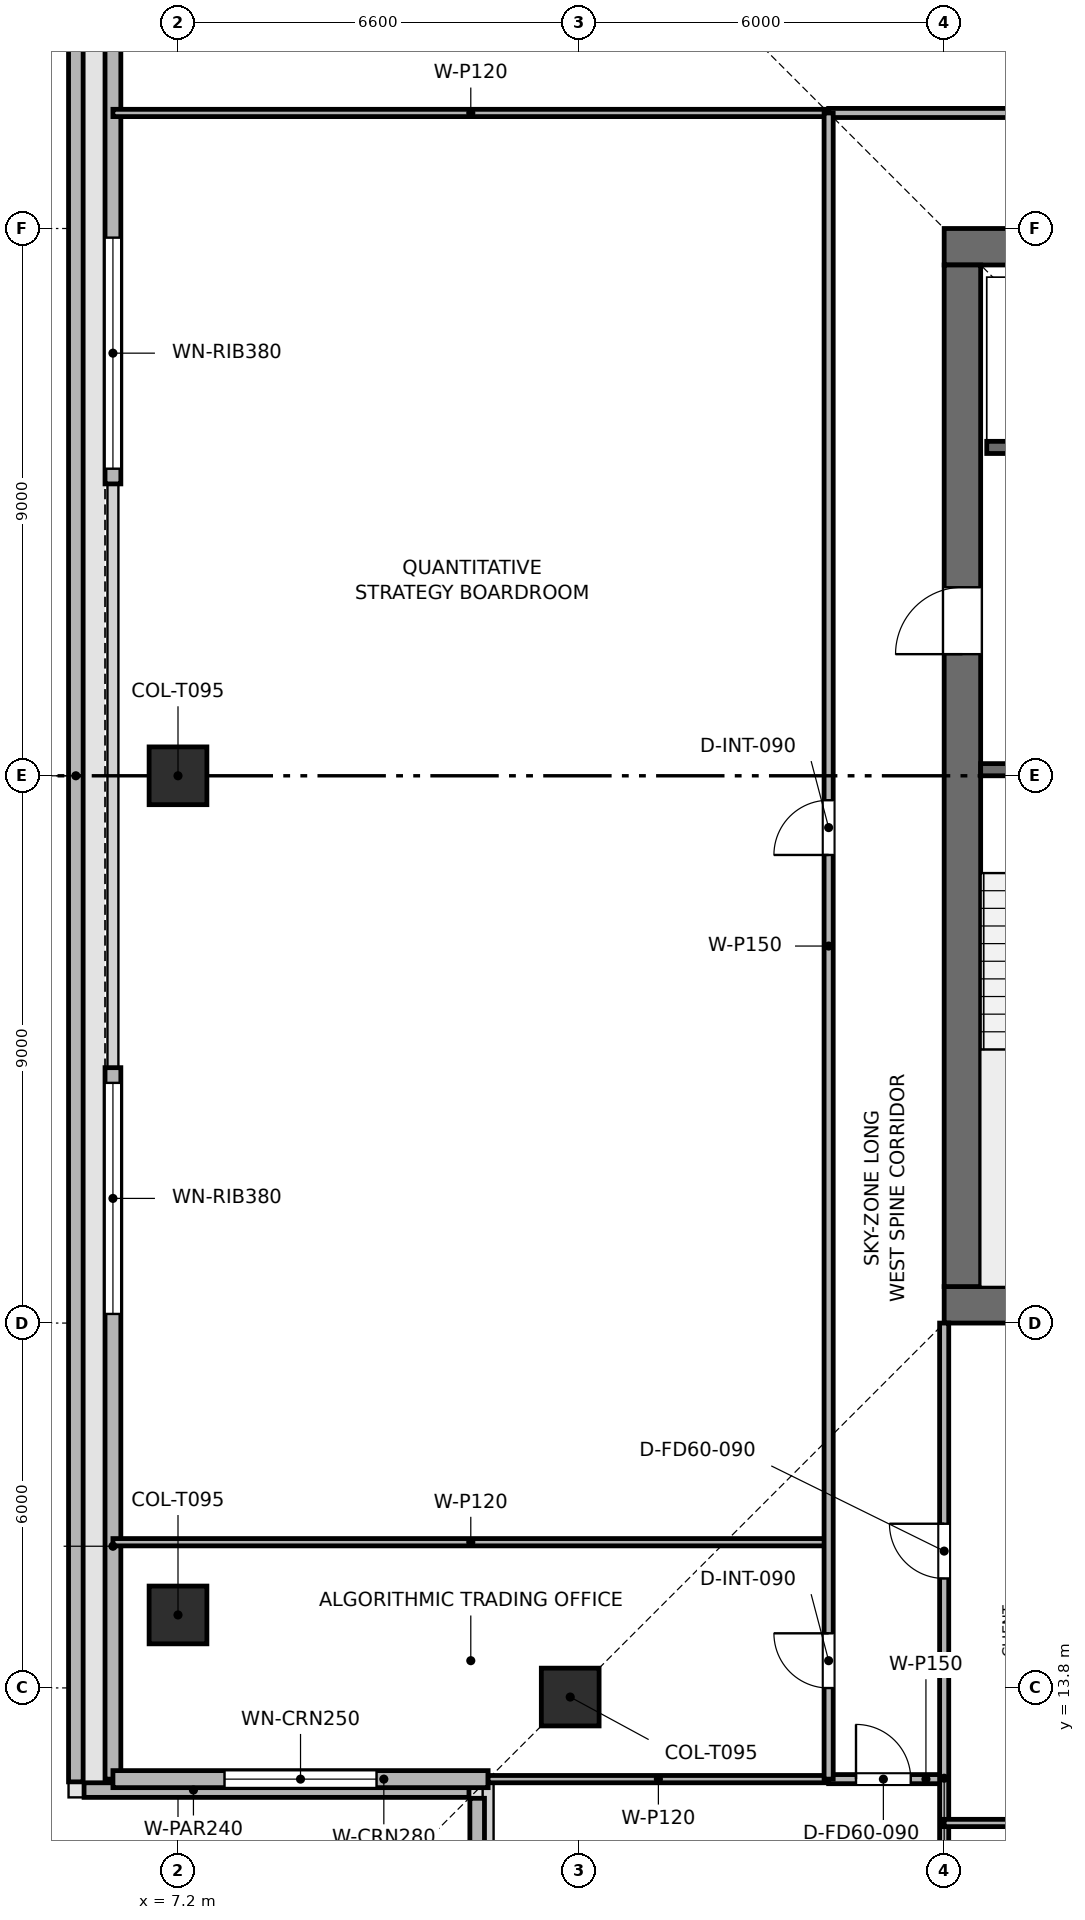
"""IFC4 building model, lengths in metres.
Left out: names, types, materials, properties, quantities, classifications, styles, units other than length and angle.
Written with IfcOpenShell. Run it as: python <this file> out.ifc"""

import sys

from ifc_helpers import new_model, si_unit, direction, frame, frame_2d, origin, origin_2d, place, context, subcontext, project, spatial, rectangle, extrude, element, fill, save


model = new_model("IFC4")
c1 = context("Model", 3, precision=1e-05, world=origin(), true_north=direction((0.0, 1.0)))
c2 = subcontext(c1, "Body", "Model", "MODEL_VIEW")
j1 = project(units=[si_unit("LENGTHUNIT", "METRE"), si_unit("PLANEANGLEUNIT", "RADIAN")], contexts=[c1])
p1 = place(None, origin())
s1 = spatial("IfcSite", under=j1, at=p1, CompositionType="ELEMENT")
p2 = place(p1, origin())
s2 = spatial("IfcBuilding", under=s1, at=p2, CompositionType="ELEMENT")
p3 = place(p2, frame((0.0, 0.0, 295.5)))
s3 = spatial("IfcBuildingStorey", under=s2, at=p3, CompositionType="ELEMENT", Elevation=295.5)
p4 = place(p3, frame((19.8, 20.1, 0.0), z_axis=(0.0, 0.0, 1.0), x_axis=(1.0, 0.0, 0.0)))
e1 = element("IfcWall", 1, at=p4, inside=s3, PredefinedType="SHEAR", context=c2, shape_type="SweptSolid", body=[
    extrude(rectangle(XDim=18.0, YDim=0.6, at=frame_2d((9.0, 0.0))), origin(), (0.0, 0.0, 1.0), 3.75),
])
p5 = place(p3, frame((19.8, 37.5, 0.0), z_axis=(0.0, 0.0, 1.0), x_axis=(1.0, 0.0, 0.0)))
e2 = element("IfcWall", 2, at=p5, inside=s3, PredefinedType="SHEAR", context=c2, shape_type="SweptSolid", body=[
    extrude(rectangle(XDim=18.0, YDim=0.6, at=frame_2d((9.0, 0.0))), origin(), (0.0, 0.0, 1.0), 3.75),
])
p6 = place(p5, frame((7.05, 0.0, 0.0)))
e3 = element("IfcOpeningElement", 3, at=p6, cuts=e2, PredefinedType="OPENING", context=c2, shape_type="SweptSolid", body=[
    extrude(rectangle(XDim=1.1, YDim=2.15, at=frame_2d((0.55, 1.075))), frame((0.0, 0.31, 0.0), z_axis=(0.0, -1.0, 0.0), x_axis=(1.0, 0.0, 0.0)), (0.0, 0.0, 1.0), 0.62),
])
p7 = place(p3, frame((20.1, 20.4, 0.0), z_axis=(0.0, 0.0, 1.0), x_axis=(0.0, 1.0, 0.0)))
e4 = element("IfcWall", 4, at=p7, inside=s3, PredefinedType="SHEAR", context=c2, shape_type="SweptSolid", body=[
    extrude(rectangle(XDim=16.8, YDim=0.6, at=frame_2d((8.4, 0.0))), origin(), (0.0, 0.0, 1.0), 3.75),
])
p8 = place(p7, frame((10.4, 0.0, 0.0)))
e5 = element("IfcOpeningElement", 5, at=p8, cuts=e4, PredefinedType="OPENING", context=c2, shape_type="SweptSolid", body=[
    extrude(rectangle(XDim=1.1, YDim=2.15, at=frame_2d((0.55, 1.075))), frame((0.0, 0.31, 0.0), z_axis=(0.0, -1.0, 0.0), x_axis=(1.0, 0.0, 0.0)), (0.0, 0.0, 1.0), 0.62),
])
for number, where, z_axis, x_axis in (
    (6, (7.2, 28.8, 0.003), (0.0, 0.0, 1.0), (1.0, 0.0, 0.0)),
    (7, (7.2, 15.0, 0.003), (0.0, 0.0, 1.0), (1.0, 0.0, 0.0)),
    (8, (13.65, 13.65, 0.003), (0.0, 0.0, 1.0), (1.0, 0.0, 0.0)),
):
    element("IfcColumn", number, at=place(p3, frame(where, z_axis=z_axis, x_axis=x_axis)), inside=s3, PredefinedType="COLUMN", context=c2, shape_type="SweptSolid", body=[
        extrude(rectangle(XDim=0.95, YDim=0.95, at=origin_2d()), origin(), (0.0, 0.0, 1.0), 3.504),
    ])
p9 = place(p3, frame((5.52, 45.345, 0.0), z_axis=(0.0, 0.0, 1.0), x_axis=(0.0, -1.0, 0.0)))
e9 = element("IfcWall", 9, at=p9, inside=s3, PredefinedType="PARAPET", context=c2, shape_type="SweptSolid", body=[
    extrude(rectangle(XDim=33.09, YDim=0.24, at=frame_2d((16.545, 0.0))), origin(), (0.0, 0.0, 1.0), 1.2),
])
for number, where, z_axis, x_axis in (
    (10, (5.655, 12.12, 0.0), (0.0, 0.0, 1.0), (1.0, 0.0, 0.0)),
    (11, (12.12, 11.985, 0.0), (0.0, 0.0, 1.0), (0.0, -1.0, 0.0)),
):
    element("IfcWall", number, at=place(p3, frame(where, z_axis=z_axis, x_axis=x_axis)), inside=s3, PredefinedType="PARAPET", context=c2, shape_type="SweptSolid", body=[
        extrude(rectangle(XDim=6.33, YDim=0.24, at=frame_2d((3.165, 0.0))), origin(), (0.0, 0.0, 1.0), 1.2),
    ])
p10 = place(p3, frame((6.13, 12.3, 0.0), z_axis=(0.0, 0.0, 1.0), x_axis=(0.0, 1.0, 0.0)))
e12 = element("IfcWall", 12, at=p10, inside=s3, PredefinedType="SOLIDWALL", context=c2, shape_type="SweptSolid", body=[
    extrude(rectangle(XDim=11.7, YDim=0.26, at=frame_2d((5.85, 0.0))), origin(), (0.0, 0.0, 1.0), 3.51),
])
p11 = place(p10, frame((7.65, 0.0, 0.9)))
e13 = element("IfcOpeningElement", 13, at=p11, cuts=e12, PredefinedType="OPENING", context=c2, shape_type="SweptSolid", body=[
    extrude(rectangle(XDim=3.8, YDim=1.9, at=frame_2d((1.9, 0.95))), frame((0.0, 0.14, 0.0), z_axis=(0.0, -1.0, 0.0), x_axis=(1.0, 0.0, 0.0)), (0.0, 0.0, 1.0), 0.28),
])
p12 = place(p3, frame((6.13, 33.6, 0.0), z_axis=(0.0, 0.0, 1.0), x_axis=(0.0, 1.0, 0.0)))
e14 = element("IfcWall", 14, at=p12, inside=s3, PredefinedType="SOLIDWALL", context=c2, shape_type="SweptSolid", body=[
    extrude(rectangle(XDim=11.7, YDim=0.26, at=frame_2d((5.85, 0.0))), origin(), (0.0, 0.0, 1.0), 3.51),
])
p13 = place(p12, frame((0.25, 0.0, 0.9)))
e15 = element("IfcOpeningElement", 15, at=p13, cuts=e14, PredefinedType="OPENING", context=c2, shape_type="SweptSolid", body=[
    extrude(rectangle(XDim=3.8, YDim=1.9, at=frame_2d((1.9, 0.95))), frame((0.0, 0.14, 0.0), z_axis=(0.0, -1.0, 0.0), x_axis=(1.0, 0.0, 0.0)), (0.0, 0.0, 1.0), 0.28),
])
p14 = place(p3, frame((12.3, 12.3, 0.0), z_axis=(0.0, 0.0, 1.0), x_axis=(-1.0, 0.0, 0.0)))
e16 = element("IfcWall", 16, at=p14, inside=s3, PredefinedType="SOLIDWALL", context=c2, shape_type="SweptSolid", body=[
    extrude(rectangle(XDim=6.17, YDim=0.28, at=frame_2d((3.085, 0.0))), origin(), (0.0, 0.0, 1.0), 3.51),
])
p15 = place(p14, frame((1.835, 0.0, 0.9)))
e17 = element("IfcOpeningElement", 17, at=p15, cuts=e16, PredefinedType="OPENING", context=c2, shape_type="SweptSolid", body=[
    extrude(rectangle(XDim=2.5, YDim=1.9, at=frame_2d((1.25, 0.95))), frame((0.0, 0.15, 0.0), z_axis=(0.0, -1.0, 0.0), x_axis=(1.0, 0.0, 0.0)), (0.0, 0.0, 1.0), 0.3),
])
p16 = place(p3, frame((20.4, 28.9, 0.0), z_axis=(0.0, 0.0, 1.0), x_axis=(1.0, 0.0, 0.0)))
e18 = element("IfcWall", 18, at=p16, inside=s3, PredefinedType="SHEAR", context=c2, shape_type="SweptSolid", body=[
    extrude(rectangle(XDim=3.15, YDim=0.2, at=frame_2d((1.575, 0.0))), origin(), (0.0, 0.0, 1.0), 3.51),
])
p17 = place(p16, frame((0.8, 0.0, 0.0)))
e19 = element("IfcOpeningElement", 19, at=p17, cuts=e18, PredefinedType="OPENING", context=c2, shape_type="SweptSolid", body=[
    extrude(rectangle(XDim=1.0, YDim=2.1, at=frame_2d((0.5, 1.05))), frame((0.0, 0.11, 0.0), z_axis=(0.0, -1.0, 0.0), x_axis=(1.0, 0.0, 0.0)), (0.0, 0.0, 1.0), 0.22),
])
p18 = place(p3, frame((20.5, 34.2, 0.0), z_axis=(0.0, 0.0, 1.0), x_axis=(1.0, 0.0, 0.0)))
e20 = element("IfcWall", 20, at=p18, inside=s3, PredefinedType="SHEAR", context=c2, shape_type="SweptSolid", body=[
    extrude(rectangle(XDim=3.05, YDim=0.2, at=frame_2d((1.525, 0.0))), origin(), (0.0, 0.0, 1.0), 3.51),
])
p19 = place(p18, frame((0.75, 0.0, 0.0)))
e21 = element("IfcOpeningElement", 21, at=p19, cuts=e20, PredefinedType="OPENING", context=c2, shape_type="SweptSolid", body=[
    extrude(rectangle(XDim=1.1, YDim=2.15, at=frame_2d((0.55, 1.075))), frame((0.0, 0.11, 0.0), z_axis=(0.0, -1.0, 0.0), x_axis=(1.0, 0.0, 0.0)), (0.0, 0.0, 1.0), 0.22),
])
p20 = place(p3, frame((6.13, 16.196, 0.0), z_axis=(0.0, 0.0, 1.0), x_axis=(1.0, 0.0, 0.0)))
e22 = element("IfcWall", 22, at=p20, inside=s3, PredefinedType="PARTITIONING", context=c2, shape_type="SweptSolid", body=[
    extrude(rectangle(XDim=11.77, YDim=0.12, at=frame_2d((5.885, 0.0))), origin(), (0.0, 0.0, 1.0), 3.095),
])
p21 = place(p3, frame((12.3, 12.3, 0.0), z_axis=(0.0, 0.0, 1.0), x_axis=(1.0, 0.0, 0.0)))
e23 = element("IfcWall", 23, at=p21, inside=s3, PredefinedType="PARTITIONING", context=c2, shape_type="SweptSolid", body=[
    extrude(rectangle(XDim=5.6, YDim=0.12, at=frame_2d((2.8, 0.0))), origin(), (0.0, 0.0, 1.0), 3.195),
])
p22 = place(p3, frame((17.9, 12.3, 0.0), z_axis=(0.0, 0.0, 1.0), x_axis=(1.0, 0.0, 0.0)))
e24 = element("IfcWall", 24, at=p22, inside=s3, PredefinedType="PARTITIONING", context=c2, shape_type="SweptSolid", body=[
    extrude(rectangle(XDim=1.9, YDim=0.15, at=frame_2d((0.95, 0.0))), origin(), (0.0, 0.0, 1.0), 3.51),
])
p23 = place(p22, frame((0.45, 0.0, 0.0)))
e25 = element("IfcOpeningElement", 25, at=p23, cuts=e24, PredefinedType="OPENING", context=c2, shape_type="SweptSolid", body=[
    extrude(rectangle(XDim=0.9, YDim=2.1, at=frame_2d((0.45, 1.05))), frame((0.0, 0.085, 0.0), z_axis=(0.0, -1.0, 0.0), x_axis=(1.0, 0.0, 0.0)), (0.0, 0.0, 1.0), 0.17),
])
p24 = place(p3, frame((19.8, 6.13, 0.0), z_axis=(0.0, 0.0, 1.0), x_axis=(0.0, 1.0, 0.0)))
e26 = element("IfcWall", 26, at=p24, inside=s3, PredefinedType="PARTITIONING", context=c2, shape_type="SweptSolid", body=[
    extrude(rectangle(XDim=13.67, YDim=0.15, at=frame_2d((6.835, 0.0))), origin(), (0.0, 0.0, 1.0), 3.095),
])
p25 = place(p24, frame((9.47, 0.0, 0.0)))
e27 = element("IfcOpeningElement", 27, at=p25, cuts=e26, PredefinedType="OPENING", context=c2, shape_type="SweptSolid", body=[
    extrude(rectangle(XDim=0.9, YDim=2.1, at=frame_2d((0.45, 1.05))), frame((0.0, 0.085, 0.0), z_axis=(0.0, -1.0, 0.0), x_axis=(1.0, 0.0, 0.0)), (0.0, 0.0, 1.0), 0.17),
])
p26 = place(p3, frame((19.8, 11.579, 0.0), z_axis=(0.0, 0.0, 1.0), x_axis=(1.0, 0.0, 0.0)))
e28 = element("IfcWall", 28, at=p26, inside=s3, PredefinedType="PARTITIONING", context=c2, shape_type="SweptSolid", body=[
    extrude(rectangle(XDim=2.417, YDim=0.12, at=frame_2d((1.208, 0.0))), origin(), (0.0, 0.0, 1.0), 3.095),
])
p27 = place(p26, frame((1.317, 0.0, 0.0)))
e29 = element("IfcOpeningElement", 29, at=p27, cuts=e28, PredefinedType="OPENING", context=c2, shape_type="SweptSolid", body=[
    extrude(rectangle(XDim=0.9, YDim=2.1, at=frame_2d((0.45, 1.05))), frame((0.0, 0.07, 0.0), z_axis=(0.0, -1.0, 0.0), x_axis=(1.0, 0.0, 0.0)), (0.0, 0.0, 1.0), 0.14),
])
p28 = place(p3, frame((6.13, 39.7, 0.0), z_axis=(0.0, 0.0, 1.0), x_axis=(1.0, 0.0, 0.0)))
e30 = element("IfcWall", 30, at=p28, inside=s3, PredefinedType="PARTITIONING", context=c2, shape_type="SweptSolid", body=[
    extrude(rectangle(XDim=11.77, YDim=0.12, at=frame_2d((5.885, 0.0))), origin(), (0.0, 0.0, 1.0), 3.095),
])
p29 = place(p3, frame((17.9, 39.7, 0.0), z_axis=(0.0, 0.0, 1.0), x_axis=(1.0, 0.0, 0.0)))
e31 = element("IfcWall", 31, at=p29, inside=s3, PredefinedType="PARTITIONING", context=c2, shape_type="SweptSolid", body=[
    extrude(rectangle(XDim=21.8, YDim=0.15, at=frame_2d((10.9, 0.0))), origin(), (0.0, 0.0, 1.0), 3.095),
])
p30 = place(p29, frame((10.45, 0.0, 0.0)))
e32 = element("IfcOpeningElement", 32, at=p30, cuts=e31, PredefinedType="OPENING", context=c2, shape_type="SweptSolid", body=[
    extrude(rectangle(XDim=0.9, YDim=2.1, at=frame_2d((0.45, 1.05))), frame((0.0, 0.085, 0.0), z_axis=(0.0, -1.0, 0.0), x_axis=(1.0, 0.0, 0.0)), (0.0, 0.0, 1.0), 0.17),
])
p31 = place(p3, frame((17.9, 12.3, 0.0), z_axis=(0.0, 0.0, 1.0), x_axis=(0.0, 1.0, 0.0)))
e33 = element("IfcWall", 33, at=p31, inside=s3, PredefinedType="PARTITIONING", context=c2, shape_type="SweptSolid", body=[
    extrude(rectangle(XDim=27.4, YDim=0.15, at=frame_2d((13.7, 0.0))), origin(), (0.0, 0.0, 1.0), 3.095),
])
p32 = place(p31, frame((1.498, 0.0, 0.0)))
e34 = element("IfcOpeningElement", 34, at=p32, cuts=e33, PredefinedType="OPENING", context=c2, shape_type="SweptSolid", body=[
    extrude(rectangle(XDim=0.9, YDim=2.1, at=frame_2d((0.45, 1.05))), frame((0.0, 0.085, 0.0), z_axis=(0.0, -1.0, 0.0), x_axis=(1.0, 0.0, 0.0)), (0.0, 0.0, 1.0), 0.17),
])
p33 = place(p31, frame((15.198, 0.0, 0.0)))
e35 = element("IfcOpeningElement", 35, at=p33, cuts=e33, PredefinedType="OPENING", context=c2, shape_type="SweptSolid", body=[
    extrude(rectangle(XDim=0.9, YDim=2.1, at=frame_2d((0.45, 1.05))), frame((0.0, 0.085, 0.0), z_axis=(0.0, -1.0, 0.0), x_axis=(1.0, 0.0, 0.0)), (0.0, 0.0, 1.0), 0.17),
])
p34 = place(p11, origin())
e36 = element("IfcWindow", 36, at=p34, inside=s3, PartitioningType="SINGLE_PANEL", PredefinedType="WINDOW", context=c2, shape_type="SweptSolid", body=[
    extrude(rectangle(XDim=3.8, YDim=1.9, at=frame_2d((1.9, 0.95))), frame((0.0, 0.03, 0.0), z_axis=(0.0, -1.0, 0.0), x_axis=(1.0, 0.0, 0.0)), (0.0, 0.0, 1.0), 0.06),
])
fill(e13, e36)
p35 = place(p13, origin())
e37 = element("IfcWindow", 37, at=p35, inside=s3, PartitioningType="SINGLE_PANEL", PredefinedType="WINDOW", context=c2, shape_type="SweptSolid", body=[
    extrude(rectangle(XDim=3.8, YDim=1.9, at=frame_2d((1.9, 0.95))), frame((0.0, 0.03, 0.0), z_axis=(0.0, -1.0, 0.0), x_axis=(1.0, 0.0, 0.0)), (0.0, 0.0, 1.0), 0.06),
])
fill(e15, e37)
p36 = place(p15, origin())
e38 = element("IfcWindow", 38, at=p36, inside=s3, PartitioningType="SINGLE_PANEL", PredefinedType="WINDOW", context=c2, shape_type="SweptSolid", body=[
    extrude(rectangle(XDim=2.5, YDim=1.9, at=frame_2d((1.25, 0.95))), frame((0.0, 0.03, 0.0), z_axis=(0.0, -1.0, 0.0), x_axis=(1.0, 0.0, 0.0)), (0.0, 0.0, 1.0), 0.06),
])
fill(e17, e38)
p37 = place(p23, origin())
e39 = element("IfcDoor", 39, at=p37, inside=s3, OperationType="SINGLE_SWING_LEFT", PredefinedType="DOOR", context=c2, shape_type="SweptSolid", body=[
    extrude(rectangle(XDim=0.9, YDim=2.1, at=frame_2d((0.45, 1.05))), frame((0.0, 0.025, 0.0), z_axis=(0.0, -1.0, 0.0), x_axis=(1.0, 0.0, 0.0)), (0.0, 0.0, 1.0), 0.05),
])
fill(e25, e39)
p38 = place(p25, origin())
e40 = element("IfcDoor", 40, at=p38, inside=s3, OperationType="SINGLE_SWING_RIGHT", PredefinedType="DOOR", context=c2, shape_type="SweptSolid", body=[
    extrude(rectangle(XDim=0.9, YDim=2.1, at=frame_2d((0.45, 1.05))), frame((0.0, 0.025, 0.0), z_axis=(0.0, -1.0, 0.0), x_axis=(1.0, 0.0, 0.0)), (0.0, 0.0, 1.0), 0.05),
])
fill(e27, e40)
p39 = place(p32, origin())
e41 = element("IfcDoor", 41, at=p39, inside=s3, OperationType="SINGLE_SWING_RIGHT", PredefinedType="DOOR", context=c2, shape_type="SweptSolid", body=[
    extrude(rectangle(XDim=0.9, YDim=2.1, at=frame_2d((0.45, 1.05))), frame((0.0, 0.025, 0.0), z_axis=(0.0, -1.0, 0.0), x_axis=(1.0, 0.0, 0.0)), (0.0, 0.0, 1.0), 0.05),
])
fill(e34, e41)
p40 = place(p33, origin())
e42 = element("IfcDoor", 42, at=p40, inside=s3, OperationType="SINGLE_SWING_LEFT", PredefinedType="DOOR", context=c2, shape_type="SweptSolid", body=[
    extrude(rectangle(XDim=0.9, YDim=2.1, at=frame_2d((0.45, 1.05))), frame((0.0, 0.025, 0.0), z_axis=(0.0, -1.0, 0.0), x_axis=(1.0, 0.0, 0.0)), (0.0, 0.0, 1.0), 0.05),
])
fill(e35, e42)
p41 = place(p8, origin())
e43 = element("IfcDoor", 43, at=p41, inside=s3, OperationType="SINGLE_SWING_LEFT", PredefinedType="DOOR", context=c2, shape_type="SweptSolid", body=[
    extrude(rectangle(XDim=1.1, YDim=2.15, at=frame_2d((0.55, 1.075))), frame((0.0, 0.025, 0.0), z_axis=(0.0, -1.0, 0.0), x_axis=(1.0, 0.0, 0.0)), (0.0, 0.0, 1.0), 0.05),
])
fill(e5, e43)
save(model, sys.argv[1])
